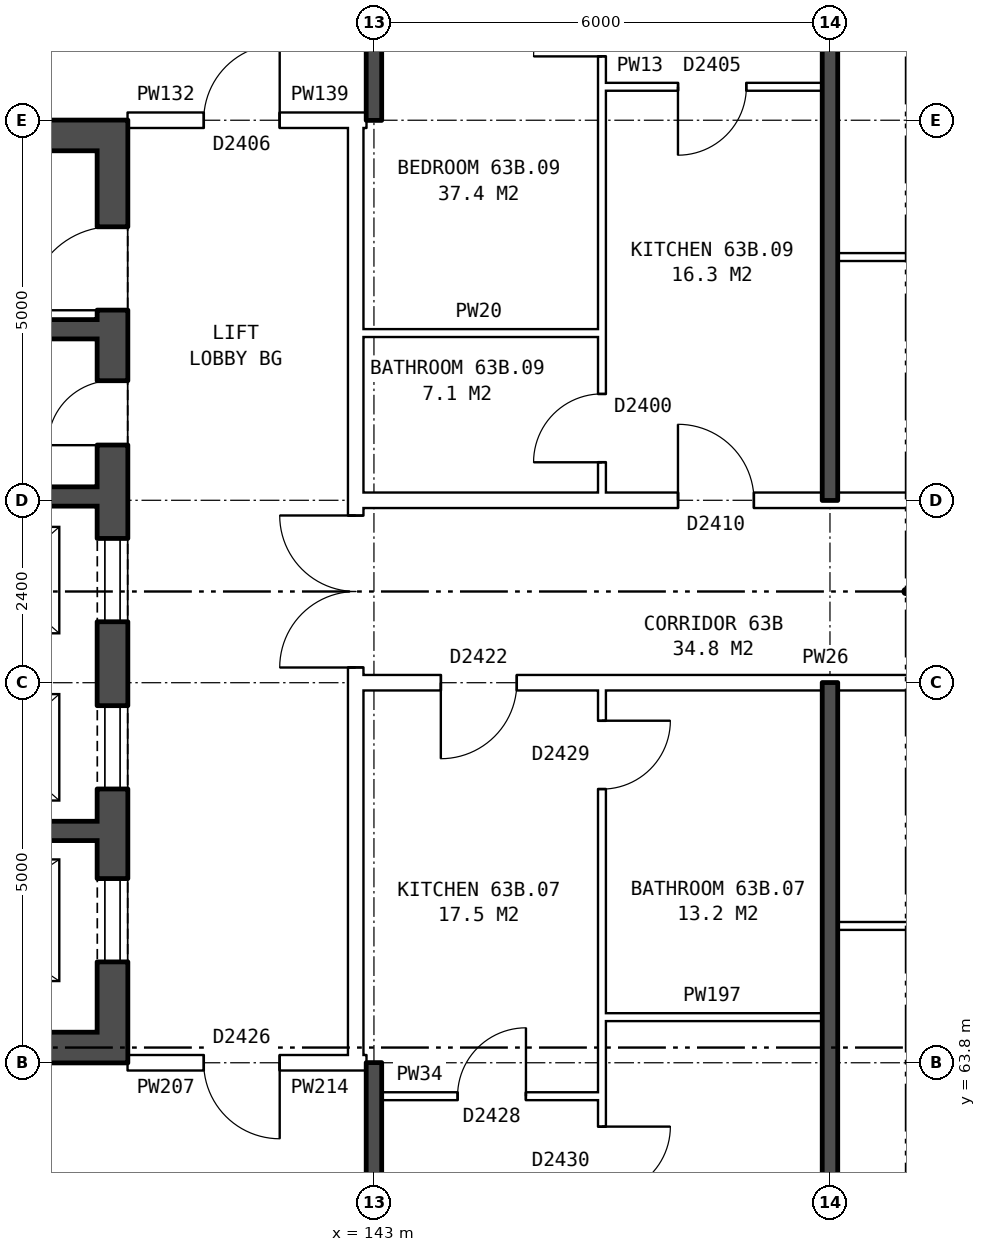
"""IFC4 building model, lengths in metres.
Left out: names, types, materials, properties, quantities, classifications, styles, units other than length and angle.
Written with IfcOpenShell. Run it as: python <this file> out.ifc"""

import sys

from ifc_helpers import new_model, si_unit, direction, frame, frame_2d, origin, place, context, subcontext, project, spatial, rectangle, extrude, element, fill, save


model = new_model("IFC4")
c1 = context("Model", 3, precision=1e-05, world=origin(), true_north=direction((0.0, 1.0)))
c2 = subcontext(c1, "Body", "Model", "MODEL_VIEW")
j1 = project(units=[si_unit("LENGTHUNIT", "METRE"), si_unit("PLANEANGLEUNIT", "RADIAN")], contexts=[c1])
p1 = place(None, origin())
s1 = spatial("IfcSite", under=j1, at=p1, CompositionType="ELEMENT")
p2 = place(p1, origin())
s2 = spatial("IfcBuilding", under=s1, at=p2, CompositionType="ELEMENT")
p3 = place(p2, frame((0.0, 0.0, 224.5)))
s3 = spatial("IfcBuildingStorey", under=s2, at=p3, CompositionType="ELEMENT", Elevation=224.5)
p4 = place(p3, frame((139.56, 63.8, 0.0), z_axis=(0.0, 0.0, 1.0), x_axis=(0.0, 1.0, 0.0)))
e1 = element("IfcWall", 1, at=p4, inside=s3, PredefinedType="SHEAR", context=c2, shape_type="SweptSolid", body=[
    extrude(rectangle(XDim=12.4, YDim=0.4, at=frame_2d((6.2, 0.0))), origin(), (0.0, 0.0, 1.0), 2.85),
])
p5 = place(p4, frame((1.325, 0.0, 0.0)))
e2 = element("IfcOpeningElement", 2, at=p5, cuts=e1, PredefinedType="OPENING", context=c2, shape_type="SweptSolid", body=[
    extrude(rectangle(XDim=1.1, YDim=2.1, at=frame_2d((0.55, 1.05))), frame((0.0, 0.21, 0.0), z_axis=(0.0, -1.0, 0.0), x_axis=(1.0, 0.0, 0.0)), (0.0, 0.0, 1.0), 0.42),
])
p6 = place(p4, frame((3.6, 0.0, 0.0)))
e3 = element("IfcOpeningElement", 3, at=p6, cuts=e1, PredefinedType="OPENING", context=c2, shape_type="SweptSolid", body=[
    extrude(rectangle(XDim=1.1, YDim=2.1, at=frame_2d((0.55, 1.05))), frame((0.0, 0.21, 0.0), z_axis=(0.0, -1.0, 0.0), x_axis=(1.0, 0.0, 0.0)), (0.0, 0.0, 1.0), 0.42),
])
p7 = place(p4, frame((5.8, 0.0, 0.0)))
e4 = element("IfcOpeningElement", 4, at=p7, cuts=e1, PredefinedType="OPENING", context=c2, shape_type="SweptSolid", body=[
    extrude(rectangle(XDim=1.1, YDim=2.1, at=frame_2d((0.55, 1.05))), frame((0.0, 0.21, 0.0), z_axis=(0.0, -1.0, 0.0), x_axis=(1.0, 0.0, 0.0)), (0.0, 0.0, 1.0), 0.42),
])
p8 = place(p4, frame((9.9, 0.0, 0.0)))
e5 = element("IfcOpeningElement", 5, at=p8, cuts=e1, PredefinedType="OPENING", context=c2, shape_type="SweptSolid", body=[
    extrude(rectangle(XDim=1.1, YDim=2.1, at=frame_2d((0.55, 1.05))), frame((0.0, 0.21, 0.0), z_axis=(0.0, -1.0, 0.0), x_axis=(1.0, 0.0, 0.0)), (0.0, 0.0, 1.0), 0.42),
])
p9 = place(p4, frame((8.125, 0.0, 0.0)))
e6 = element("IfcOpeningElement", 6, at=p9, cuts=e1, PredefinedType="OPENING", context=c2, shape_type="SweptSolid", body=[
    extrude(rectangle(XDim=0.85, YDim=2.1, at=frame_2d((0.425, 1.05))), frame((0.0, 0.21, 0.0), z_axis=(0.0, -1.0, 0.0), x_axis=(1.0, 0.0, 0.0)), (0.0, 0.0, 1.0), 0.42),
])
for number, where, z_axis, x_axis in (
    (7, (139.36, 64.0, 0.0), (0.0, 0.0, 1.0), (-1.0, 0.0, 0.0)),
    (8, (139.36, 76.0, 0.0), (0.0, 0.0, 1.0), (-1.0, 0.0, 0.0)),
):
    element("IfcWall", number, at=place(p3, frame(where, z_axis=z_axis, x_axis=x_axis)), inside=s3, PredefinedType="SHEAR", context=c2, shape_type="SweptSolid", body=[
        extrude(rectangle(XDim=7.6, YDim=0.4, at=frame_2d((3.8, 0.0))), origin(), (0.0, 0.0, 1.0), 2.85),
    ])
p10 = place(p3, frame((139.36, 66.85, 0.0), z_axis=(0.0, 0.0, 1.0), x_axis=(-1.0, 0.0, 0.0)))
e9 = element("IfcWall", 9, at=p10, inside=s3, PredefinedType="SHEAR", context=c2, shape_type="SweptSolid", body=[
    extrude(rectangle(XDim=4.775, YDim=0.25, at=frame_2d((2.388, 0.0))), origin(), (0.0, 0.0, 1.0), 2.85),
])
p11 = place(p3, frame((139.36, 71.25, 0.0), z_axis=(0.0, 0.0, 1.0), x_axis=(-1.0, 0.0, 0.0)))
e10 = element("IfcWall", 10, at=p11, inside=s3, PredefinedType="SHEAR", context=c2, shape_type="SweptSolid", body=[
    extrude(rectangle(XDim=7.6, YDim=0.25, at=frame_2d((3.8, 0.0))), origin(), (0.0, 0.0, 1.0), 2.85),
])
p12 = place(p11, frame((5.175, 0.0, 0.0)))
e11 = element("IfcOpeningElement", 11, at=p12, cuts=e10, PredefinedType="OPENING", context=c2, shape_type="SweptSolid", body=[
    extrude(rectangle(XDim=1.1, YDim=2.1, at=frame_2d((0.55, 1.05))), frame((0.0, 0.135, 0.0), z_axis=(0.0, -1.0, 0.0), x_axis=(1.0, 0.0, 0.0)), (0.0, 0.0, 1.0), 0.27),
])
p13 = place(p11, frame((3.35, 0.0, 0.0)))
e12 = element("IfcOpeningElement", 12, at=p13, cuts=e10, PredefinedType="OPENING", context=c2, shape_type="SweptSolid", body=[
    extrude(rectangle(XDim=0.85, YDim=2.1, at=frame_2d((0.425, 1.05))), frame((0.0, 0.135, 0.0), z_axis=(0.0, -1.0, 0.0), x_axis=(1.0, 0.0, 0.0)), (0.0, 0.0, 1.0), 0.27),
])
p14 = place(p3, frame((139.36, 73.45, 0.0), z_axis=(0.0, 0.0, 1.0), x_axis=(-1.0, 0.0, 0.0)))
e13 = element("IfcWall", 13, at=p14, inside=s3, PredefinedType="SHEAR", context=c2, shape_type="SweptSolid", body=[
    extrude(rectangle(XDim=2.525, YDim=0.25, at=frame_2d((1.263, 0.0))), origin(), (0.0, 0.0, 1.0), 2.85),
])
p15 = place(p3, frame((142.76, 63.9, 0.0), z_axis=(0.0, 0.0, 1.0), x_axis=(0.0, 1.0, 0.0)))
e14 = element("IfcWall", 14, at=p15, inside=s3, PredefinedType="PARTITIONING", context=c2, shape_type="SweptSolid", body=[
    extrude(rectangle(XDim=12.2, YDim=0.2, at=frame_2d((6.1, 0.0))), origin(), (0.0, 0.0, 1.0), 2.85),
])
p16 = place(p15, frame((5.1, 0.0, 0.0)))
e15 = element("IfcOpeningElement", 15, at=p16, cuts=e14, PredefinedType="OPENING", context=c2, shape_type="SweptSolid", body=[
    extrude(rectangle(XDim=2.0, YDim=2.1, at=frame_2d((1.0, 1.05))), frame((0.0, 0.11, 0.0), z_axis=(0.0, -1.0, 0.0), x_axis=(1.0, 0.0, 0.0)), (0.0, 0.0, 1.0), 0.22),
])
p17 = place(p3, frame((143.1, 63.36, 0.0), z_axis=(0.0, 0.0, 1.0), x_axis=(1.0, 0.0, 0.0)))
e16 = element("IfcWall", 16, at=p17, inside=s3, PredefinedType="PARTITIONING", context=c2, shape_type="SweptSolid", body=[
    extrude(rectangle(XDim=2.9, YDim=0.1, at=frame_2d((1.45, 0.0))), origin(), (0.0, 0.0, 1.0), 2.85),
])
p18 = place(p17, frame((1.0, 0.0, 0.0)))
e17 = element("IfcOpeningElement", 17, at=p18, cuts=e16, PredefinedType="OPENING", context=c2, shape_type="SweptSolid", body=[
    extrude(rectangle(XDim=0.9, YDim=2.1, at=frame_2d((0.45, 1.05))), frame((0.0, 0.06, 0.0), z_axis=(0.0, -1.0, 0.0), x_axis=(1.0, 0.0, 0.0)), (0.0, 0.0, 1.0), 0.12),
])
p19 = place(p3, frame((139.76, 63.8, 0.0), z_axis=(0.0, 0.0, 1.0), x_axis=(1.0, 0.0, 0.0)))
e18 = element("IfcWall", 18, at=p19, inside=s3, PredefinedType="PARTITIONING", context=c2, shape_type="SweptSolid", body=[
    extrude(rectangle(XDim=3.0, YDim=0.2, at=frame_2d((1.5, 0.0))), origin(), (0.0, 0.0, 1.0), 2.85),
])
p20 = place(p19, frame((1.0, 0.0, 0.0)))
e19 = element("IfcOpeningElement", 19, at=p20, cuts=e18, PredefinedType="OPENING", context=c2, shape_type="SweptSolid", body=[
    extrude(rectangle(XDim=1.0, YDim=2.1, at=frame_2d((0.5, 1.05))), frame((0.0, 0.11, 0.0), z_axis=(0.0, -1.0, 0.0), x_axis=(1.0, 0.0, 0.0)), (0.0, 0.0, 1.0), 0.22),
])
p21 = place(p3, frame((142.76, 63.8, 0.0), z_axis=(0.0, 0.0, 1.0), x_axis=(1.0, 0.0, 0.0)))
e20 = element("IfcWall", 20, at=p21, inside=s3, PredefinedType="PARTITIONING", context=c2, shape_type="SweptSolid", body=[
    extrude(rectangle(XDim=0.14, YDim=0.2, at=frame_2d((0.07, 0.0))), origin(), (0.0, 0.0, 1.0), 2.85),
])
for number, where, z_axis, x_axis in (
    (21, (146.0, 64.4, 0.0), (0.0, 0.0, 1.0), (1.0, 0.0, 0.0)),
    (22, (149.1, 65.6, 0.0), (0.0, 0.0, 1.0), (1.0, 0.0, 0.0)),
):
    element("IfcWall", number, at=place(p3, frame(where, z_axis=z_axis, x_axis=x_axis)), inside=s3, PredefinedType="PARTITIONING", context=c2, shape_type="SweptSolid", body=[
        extrude(rectangle(XDim=2.9, YDim=0.1, at=frame_2d((1.45, 0.0))), origin(), (0.0, 0.0, 1.0), 2.85),
    ])
p22 = place(p3, frame((142.76, 68.8, 0.0), z_axis=(0.0, 0.0, 1.0), x_axis=(1.0, 0.0, 0.0)))
e23 = element("IfcWall", 23, at=p22, inside=s3, PredefinedType="PARTITIONING", context=c2, shape_type="SweptSolid", body=[
    extrude(rectangle(XDim=14.48, YDim=0.2, at=frame_2d((7.24, 0.0))), origin(), (0.0, 0.0, 1.0), 2.85),
])
p23 = place(p22, frame((1.12, 0.0, 0.0)))
e24 = element("IfcOpeningElement", 24, at=p23, cuts=e23, PredefinedType="OPENING", context=c2, shape_type="SweptSolid", body=[
    extrude(rectangle(XDim=1.0, YDim=2.1, at=frame_2d((0.5, 1.05))), frame((0.0, 0.11, 0.0), z_axis=(0.0, -1.0, 0.0), x_axis=(1.0, 0.0, 0.0)), (0.0, 0.0, 1.0), 0.22),
])
p24 = place(p22, frame((10.24, 0.0, 0.0)))
e25 = element("IfcOpeningElement", 25, at=p24, cuts=e23, PredefinedType="OPENING", context=c2, shape_type="SweptSolid", body=[
    extrude(rectangle(XDim=1.0, YDim=2.1, at=frame_2d((0.5, 1.05))), frame((0.0, 0.11, 0.0), z_axis=(0.0, -1.0, 0.0), x_axis=(1.0, 0.0, 0.0)), (0.0, 0.0, 1.0), 0.22),
])
p25 = place(p3, frame((142.76, 71.2, 0.0), z_axis=(0.0, 0.0, 1.0), x_axis=(1.0, 0.0, 0.0)))
e26 = element("IfcWall", 26, at=p25, inside=s3, PredefinedType="PARTITIONING", context=c2, shape_type="SweptSolid", body=[
    extrude(rectangle(XDim=14.48, YDim=0.2, at=frame_2d((7.24, 0.0))), origin(), (0.0, 0.0, 1.0), 2.85),
])
p26 = place(p25, frame((4.24, 0.0, 0.0)))
e27 = element("IfcOpeningElement", 27, at=p26, cuts=e26, PredefinedType="OPENING", context=c2, shape_type="SweptSolid", body=[
    extrude(rectangle(XDim=1.0, YDim=2.1, at=frame_2d((0.5, 1.05))), frame((0.0, 0.11, 0.0), z_axis=(0.0, -1.0, 0.0), x_axis=(1.0, 0.0, 0.0)), (0.0, 0.0, 1.0), 0.22),
])
p27 = place(p25, frame((10.24, 0.0, 0.0)))
e28 = element("IfcOpeningElement", 28, at=p27, cuts=e26, PredefinedType="OPENING", context=c2, shape_type="SweptSolid", body=[
    extrude(rectangle(XDim=1.0, YDim=2.1, at=frame_2d((0.5, 1.05))), frame((0.0, 0.11, 0.0), z_axis=(0.0, -1.0, 0.0), x_axis=(1.0, 0.0, 0.0)), (0.0, 0.0, 1.0), 0.22),
])
p28 = place(p3, frame((142.76, 73.4, 0.0), z_axis=(0.0, 0.0, 1.0), x_axis=(1.0, 0.0, 0.0)))
e29 = element("IfcWall", 29, at=p28, inside=s3, PredefinedType="PARTITIONING", context=c2, shape_type="SweptSolid", body=[
    extrude(rectangle(XDim=3.24, YDim=0.1, at=frame_2d((1.62, 0.0))), origin(), (0.0, 0.0, 1.0), 2.85),
])
p29 = place(p3, frame((149.1, 74.4, 0.0), z_axis=(0.0, 0.0, 1.0), x_axis=(1.0, 0.0, 0.0)))
e30 = element("IfcWall", 30, at=p29, inside=s3, PredefinedType="PARTITIONING", context=c2, shape_type="SweptSolid", body=[
    extrude(rectangle(XDim=2.9, YDim=0.1, at=frame_2d((1.45, 0.0))), origin(), (0.0, 0.0, 1.0), 2.85),
])
p30 = place(p3, frame((139.76, 76.2, 0.0), z_axis=(0.0, 0.0, 1.0), x_axis=(1.0, 0.0, 0.0)))
e31 = element("IfcWall", 31, at=p30, inside=s3, PredefinedType="PARTITIONING", context=c2, shape_type="SweptSolid", body=[
    extrude(rectangle(XDim=3.0, YDim=0.2, at=frame_2d((1.5, 0.0))), origin(), (0.0, 0.0, 1.0), 2.85),
])
p31 = place(p30, frame((1.0, 0.0, 0.0)))
e32 = element("IfcOpeningElement", 32, at=p31, cuts=e31, PredefinedType="OPENING", context=c2, shape_type="SweptSolid", body=[
    extrude(rectangle(XDim=1.0, YDim=2.1, at=frame_2d((0.5, 1.05))), frame((0.0, 0.11, 0.0), z_axis=(0.0, -1.0, 0.0), x_axis=(1.0, 0.0, 0.0)), (0.0, 0.0, 1.0), 0.22),
])
p32 = place(p3, frame((142.76, 76.2, 0.0), z_axis=(0.0, 0.0, 1.0), x_axis=(1.0, 0.0, 0.0)))
e33 = element("IfcWall", 33, at=p32, inside=s3, PredefinedType="PARTITIONING", context=c2, shape_type="SweptSolid", body=[
    extrude(rectangle(XDim=0.14, YDim=0.2, at=frame_2d((0.07, 0.0))), origin(), (0.0, 0.0, 1.0), 2.85),
])
p33 = place(p3, frame((146.0, 76.64, 0.0), z_axis=(0.0, 0.0, 1.0), x_axis=(1.0, 0.0, 0.0)))
e34 = element("IfcWall", 34, at=p33, inside=s3, PredefinedType="PARTITIONING", context=c2, shape_type="SweptSolid", body=[
    extrude(rectangle(XDim=2.9, YDim=0.1, at=frame_2d((1.45, 0.0))), origin(), (0.0, 0.0, 1.0), 2.85),
])
p34 = place(p33, frame((1.0, 0.0, 0.0)))
e35 = element("IfcOpeningElement", 35, at=p34, cuts=e34, PredefinedType="OPENING", context=c2, shape_type="SweptSolid", body=[
    extrude(rectangle(XDim=0.9, YDim=2.1, at=frame_2d((0.45, 1.05))), frame((0.0, 0.06, 0.0), z_axis=(0.0, -1.0, 0.0), x_axis=(1.0, 0.0, 0.0)), (0.0, 0.0, 1.0), 0.12),
])
for number, where, z_axis, x_axis in (
    (36, (143.0, 54.36, 0.0), (0.0, 0.0, 1.0), (0.0, 1.0, 0.0)),
    (37, (143.0, 76.2, 0.0), (0.0, 0.0, 1.0), (0.0, 1.0, 0.0)),
):
    element("IfcWall", number, at=place(p3, frame(where, z_axis=z_axis, x_axis=x_axis)), inside=s3, PredefinedType="SOLIDWALL", context=c2, shape_type="SweptSolid", body=[
        extrude(rectangle(XDim=9.44, YDim=0.2, at=frame_2d((4.72, 0.0))), origin(), (0.0, 0.0, 1.0), 2.85),
    ])
p35 = place(p3, frame((146.0, 54.36, 0.0), z_axis=(0.0, 0.0, 1.0), x_axis=(0.0, 1.0, 0.0)))
e38 = element("IfcWall", 38, at=p35, inside=s3, PredefinedType="PARTITIONING", context=c2, shape_type="SweptSolid", body=[
    extrude(rectangle(XDim=14.34, YDim=0.1, at=frame_2d((7.17, 0.0))), origin(), (0.0, 0.0, 1.0), 2.85),
])
p36 = place(p35, frame((7.7, 0.0, 0.0)))
e39 = element("IfcOpeningElement", 39, at=p36, cuts=e38, PredefinedType="OPENING", context=c2, shape_type="SweptSolid", body=[
    extrude(rectangle(XDim=0.9, YDim=2.1, at=frame_2d((0.45, 1.05))), frame((0.0, 0.06, 0.0), z_axis=(0.0, -1.0, 0.0), x_axis=(1.0, 0.0, 0.0)), (0.0, 0.0, 1.0), 0.12),
])
p37 = place(p35, frame((13.04, 0.0, 0.0)))
e40 = element("IfcOpeningElement", 40, at=p37, cuts=e38, PredefinedType="OPENING", context=c2, shape_type="SweptSolid", body=[
    extrude(rectangle(XDim=0.9, YDim=2.1, at=frame_2d((0.45, 1.05))), frame((0.0, 0.06, 0.0), z_axis=(0.0, -1.0, 0.0), x_axis=(1.0, 0.0, 0.0)), (0.0, 0.0, 1.0), 0.12),
])
p38 = place(p3, frame((146.0, 71.3, 0.0), z_axis=(0.0, 0.0, 1.0), x_axis=(0.0, 1.0, 0.0)))
e41 = element("IfcWall", 41, at=p38, inside=s3, PredefinedType="PARTITIONING", context=c2, shape_type="SweptSolid", body=[
    extrude(rectangle(XDim=14.34, YDim=0.1, at=frame_2d((7.17, 0.0))), origin(), (0.0, 0.0, 1.0), 2.85),
])
p39 = place(p38, frame((5.74, 0.0, 0.0)))
e42 = element("IfcOpeningElement", 42, at=p39, cuts=e41, PredefinedType="OPENING", context=c2, shape_type="SweptSolid", body=[
    extrude(rectangle(XDim=0.9, YDim=2.1, at=frame_2d((0.45, 1.05))), frame((0.0, 0.06, 0.0), z_axis=(0.0, -1.0, 0.0), x_axis=(1.0, 0.0, 0.0)), (0.0, 0.0, 1.0), 0.12),
])
p40 = place(p38, frame((0.4, 0.0, 0.0)))
e43 = element("IfcOpeningElement", 43, at=p40, cuts=e41, PredefinedType="OPENING", context=c2, shape_type="SweptSolid", body=[
    extrude(rectangle(XDim=0.9, YDim=2.1, at=frame_2d((0.45, 1.05))), frame((0.0, 0.06, 0.0), z_axis=(0.0, -1.0, 0.0), x_axis=(1.0, 0.0, 0.0)), (0.0, 0.0, 1.0), 0.12),
])
for number, where, z_axis, x_axis in (
    (44, (149.0, 54.36, 0.0), (0.0, 0.0, 1.0), (0.0, 1.0, 0.0)),
    (45, (149.0, 71.2, 0.0), (0.0, 0.0, 1.0), (0.0, 1.0, 0.0)),
):
    element("IfcWall", number, at=place(p3, frame(where, z_axis=z_axis, x_axis=x_axis)), inside=s3, PredefinedType="SOLIDWALL", context=c2, shape_type="SweptSolid", body=[
        extrude(rectangle(XDim=14.44, YDim=0.2, at=frame_2d((7.22, 0.0))), origin(), (0.0, 0.0, 1.0), 2.85),
    ])
p41 = place(p5, origin())
e46 = element("IfcDoor", 46, at=p41, inside=s3, OperationType="DOUBLE_DOOR_SLIDING", PredefinedType="DOOR", context=c2, shape_type="SweptSolid", body=[
    extrude(rectangle(XDim=1.1, YDim=2.1, at=frame_2d((0.55, 1.05))), frame((0.0, 0.185, 0.0), z_axis=(0.0, -1.0, 0.0), x_axis=(1.0, 0.0, 0.0)), (0.0, 0.0, 1.0), 0.05),
])
fill(e2, e46)
p42 = place(p6, origin())
e47 = element("IfcDoor", 47, at=p42, inside=s3, OperationType="DOUBLE_DOOR_SLIDING", PredefinedType="DOOR", context=c2, shape_type="SweptSolid", body=[
    extrude(rectangle(XDim=1.1, YDim=2.1, at=frame_2d((0.55, 1.05))), frame((0.0, 0.185, 0.0), z_axis=(0.0, -1.0, 0.0), x_axis=(1.0, 0.0, 0.0)), (0.0, 0.0, 1.0), 0.05),
])
fill(e3, e47)
p43 = place(p7, origin())
e48 = element("IfcDoor", 48, at=p43, inside=s3, OperationType="DOUBLE_DOOR_SLIDING", PredefinedType="DOOR", context=c2, shape_type="SweptSolid", body=[
    extrude(rectangle(XDim=1.1, YDim=2.1, at=frame_2d((0.55, 1.05))), frame((0.0, 0.185, 0.0), z_axis=(0.0, -1.0, 0.0), x_axis=(1.0, 0.0, 0.0)), (0.0, 0.0, 1.0), 0.05),
])
fill(e4, e48)
p44 = place(p8, origin())
e49 = element("IfcDoor", 49, at=p44, inside=s3, OperationType="SINGLE_SWING_LEFT", PredefinedType="DOOR", context=c2, shape_type="SweptSolid", body=[
    extrude(rectangle(XDim=1.1, YDim=2.1, at=frame_2d((0.55, 1.05))), frame((0.0, 0.185, 0.0), z_axis=(0.0, -1.0, 0.0), x_axis=(1.0, 0.0, 0.0)), (0.0, 0.0, 1.0), 0.05),
])
fill(e5, e49)
p45 = place(p9, origin())
e50 = element("IfcDoor", 50, at=p45, inside=s3, OperationType="SINGLE_SWING_LEFT", PredefinedType="DOOR", context=c2, shape_type="SweptSolid", body=[
    extrude(rectangle(XDim=0.85, YDim=2.1, at=frame_2d((0.425, 1.05))), frame((0.0, 0.185, 0.0), z_axis=(0.0, -1.0, 0.0), x_axis=(1.0, 0.0, 0.0)), (0.0, 0.0, 1.0), 0.05),
])
fill(e6, e50)
p46 = place(p16, origin())
e51 = element("IfcDoor", 51, at=p46, inside=s3, OperationType="DOUBLE_DOOR_SINGLE_SWING", PredefinedType="DOOR", context=c2, shape_type="SweptSolid", body=[
    extrude(rectangle(XDim=2.0, YDim=2.1, at=frame_2d((1.0, 1.05))), frame((0.0, 0.025, 0.0), z_axis=(0.0, -1.0, 0.0), x_axis=(1.0, 0.0, 0.0)), (0.0, 0.0, 1.0), 0.05),
])
fill(e15, e51)
p47 = place(p20, frame((1.0, 0.0, 0.0), z_axis=(0.0, 0.0, 1.0), x_axis=(-1.0, 0.0, 0.0)))
e52 = element("IfcDoor", 52, at=p47, inside=s3, OperationType="SINGLE_SWING_LEFT", PredefinedType="DOOR", context=c2, shape_type="SweptSolid", body=[
    extrude(rectangle(XDim=1.0, YDim=2.1, at=frame_2d((0.5, 1.05))), frame((0.0, 0.025, 0.0), z_axis=(0.0, -1.0, 0.0), x_axis=(1.0, 0.0, 0.0)), (0.0, 0.0, 1.0), 0.05),
])
fill(e19, e52)
p48 = place(p31, origin())
e53 = element("IfcDoor", 53, at=p48, inside=s3, OperationType="SINGLE_SWING_RIGHT", PredefinedType="DOOR", context=c2, shape_type="SweptSolid", body=[
    extrude(rectangle(XDim=1.0, YDim=2.1, at=frame_2d((0.5, 1.05))), frame((0.0, 0.025, 0.0), z_axis=(0.0, -1.0, 0.0), x_axis=(1.0, 0.0, 0.0)), (0.0, 0.0, 1.0), 0.05),
])
fill(e32, e53)
p49 = place(p36, frame((0.9, 0.0, 0.0), z_axis=(0.0, 0.0, 1.0), x_axis=(-1.0, 0.0, 0.0)))
e54 = element("IfcDoor", 54, at=p49, inside=s3, OperationType="SINGLE_SWING_LEFT", PredefinedType="DOOR", context=c2, shape_type="SweptSolid", body=[
    extrude(rectangle(XDim=0.9, YDim=2.1, at=frame_2d((0.45, 1.05))), frame((0.0, 0.025, 0.0), z_axis=(0.0, -1.0, 0.0), x_axis=(1.0, 0.0, 0.0)), (0.0, 0.0, 1.0), 0.05),
])
fill(e39, e54)
p50 = place(p23, frame((1.0, 0.0, 0.0), z_axis=(0.0, 0.0, 1.0), x_axis=(-1.0, 0.0, 0.0)))
e55 = element("IfcDoor", 55, at=p50, inside=s3, OperationType="SINGLE_SWING_RIGHT", PredefinedType="DOOR", context=c2, shape_type="SweptSolid", body=[
    extrude(rectangle(XDim=1.0, YDim=2.1, at=frame_2d((0.5, 1.05))), frame((0.0, 0.025, 0.0), z_axis=(0.0, -1.0, 0.0), x_axis=(1.0, 0.0, 0.0)), (0.0, 0.0, 1.0), 0.05),
])
fill(e24, e55)
p51 = place(p18, origin())
e56 = element("IfcDoor", 56, at=p51, inside=s3, OperationType="SINGLE_SWING_RIGHT", PredefinedType="DOOR", context=c2, shape_type="SweptSolid", body=[
    extrude(rectangle(XDim=0.9, YDim=2.1, at=frame_2d((0.45, 1.05))), frame((0.0, 0.025, 0.0), z_axis=(0.0, -1.0, 0.0), x_axis=(1.0, 0.0, 0.0)), (0.0, 0.0, 1.0), 0.05),
])
fill(e17, e56)
p52 = place(p37, frame((0.9, 0.0, 0.0), z_axis=(0.0, 0.0, 1.0), x_axis=(-1.0, 0.0, 0.0)))
e57 = element("IfcDoor", 57, at=p52, inside=s3, OperationType="SINGLE_SWING_LEFT", PredefinedType="DOOR", context=c2, shape_type="SweptSolid", body=[
    extrude(rectangle(XDim=0.9, YDim=2.1, at=frame_2d((0.45, 1.05))), frame((0.0, 0.025, 0.0), z_axis=(0.0, -1.0, 0.0), x_axis=(1.0, 0.0, 0.0)), (0.0, 0.0, 1.0), 0.05),
])
fill(e40, e57)
p53 = place(p39, origin())
e58 = element("IfcDoor", 58, at=p53, inside=s3, OperationType="SINGLE_SWING_LEFT", PredefinedType="DOOR", context=c2, shape_type="SweptSolid", body=[
    extrude(rectangle(XDim=0.9, YDim=2.1, at=frame_2d((0.45, 1.05))), frame((0.0, 0.025, 0.0), z_axis=(0.0, -1.0, 0.0), x_axis=(1.0, 0.0, 0.0)), (0.0, 0.0, 1.0), 0.05),
])
fill(e42, e58)
p54 = place(p26, origin())
e59 = element("IfcDoor", 59, at=p54, inside=s3, OperationType="SINGLE_SWING_LEFT", PredefinedType="DOOR", context=c2, shape_type="SweptSolid", body=[
    extrude(rectangle(XDim=1.0, YDim=2.1, at=frame_2d((0.5, 1.05))), frame((0.0, 0.025, 0.0), z_axis=(0.0, -1.0, 0.0), x_axis=(1.0, 0.0, 0.0)), (0.0, 0.0, 1.0), 0.05),
])
fill(e27, e59)
p55 = place(p34, frame((0.9, 0.0, 0.0), z_axis=(0.0, 0.0, 1.0), x_axis=(-1.0, 0.0, 0.0)))
e60 = element("IfcDoor", 60, at=p55, inside=s3, OperationType="SINGLE_SWING_RIGHT", PredefinedType="DOOR", context=c2, shape_type="SweptSolid", body=[
    extrude(rectangle(XDim=0.9, YDim=2.1, at=frame_2d((0.45, 1.05))), frame((0.0, 0.025, 0.0), z_axis=(0.0, -1.0, 0.0), x_axis=(1.0, 0.0, 0.0)), (0.0, 0.0, 1.0), 0.05),
])
fill(e35, e60)
p56 = place(p40, origin())
e61 = element("IfcDoor", 61, at=p56, inside=s3, OperationType="SINGLE_SWING_LEFT", PredefinedType="DOOR", context=c2, shape_type="SweptSolid", body=[
    extrude(rectangle(XDim=0.9, YDim=2.1, at=frame_2d((0.45, 1.05))), frame((0.0, 0.025, 0.0), z_axis=(0.0, -1.0, 0.0), x_axis=(1.0, 0.0, 0.0)), (0.0, 0.0, 1.0), 0.05),
])
fill(e43, e61)
save(model, sys.argv[1])
